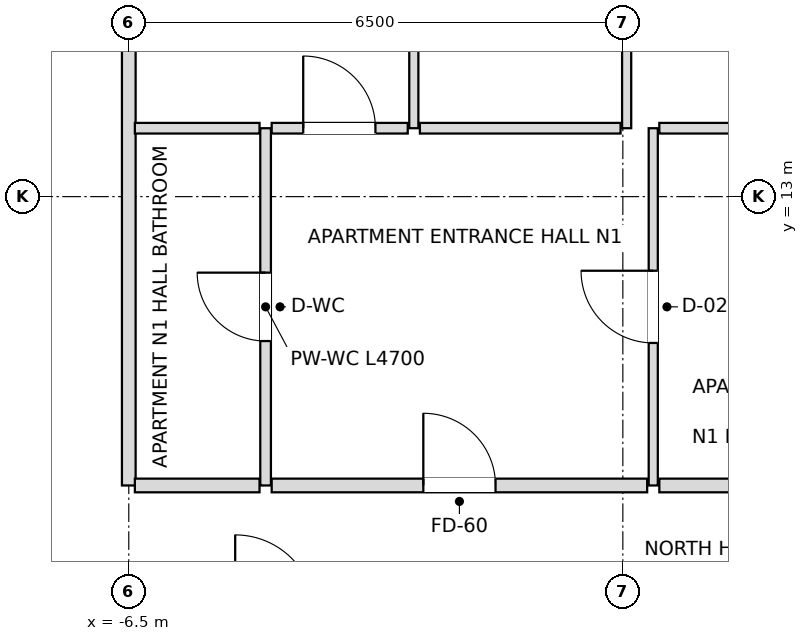
"""IFC4 building model, lengths in metres.
Left out: names, types, materials, properties, quantities, classifications, styles, units other than length and angle.
Written with IfcOpenShell. Run it as: python <this file> out.ifc"""

import sys

from ifc_helpers import new_model, si_unit, direction, frame, frame_2d, origin, place, context, subcontext, project, spatial, rectangle, extrude, element, fill, save


model = new_model("IFC4")
c1 = context("Model", 3, precision=1e-05, world=origin(), true_north=direction((0.0, 1.0)))
c2 = subcontext(c1, "Body", "Model", "MODEL_VIEW")
j1 = project(units=[si_unit("LENGTHUNIT", "METRE"), si_unit("PLANEANGLEUNIT", "RADIAN")], contexts=[c1])
p1 = place(None, origin())
s1 = spatial("IfcSite", under=j1, at=p1, CompositionType="ELEMENT")
p2 = place(p1, origin())
s2 = spatial("IfcBuilding", under=s1, at=p2, CompositionType="ELEMENT")
p3 = place(p2, frame((0.0, 0.0, 233.1)))
s3 = spatial("IfcBuildingStorey", under=s2, at=p3, CompositionType="ELEMENT", Elevation=233.1)
p4 = place(p3, frame((-6.5, 9.2, 0.0), z_axis=(0.0, 0.0, 1.0), x_axis=(0.0, 1.0, 0.0)))
e1 = element("IfcWall", 1, at=p4, inside=s3, PredefinedType="PARTITIONING", context=c2, shape_type="SweptSolid", body=[
    extrude(rectangle(XDim=10.7, YDim=0.18, at=frame_2d((5.35, 0.0))), origin(), (0.0, 0.0, 1.0), 2.826),
])
p5 = place(p3, frame((-4.7, 9.2, 0.0), z_axis=(0.0, 0.0, 1.0), x_axis=(0.0, 1.0, 0.0)))
e2 = element("IfcWall", 2, at=p5, inside=s3, PredefinedType="PARTITIONING", context=c2, shape_type="SweptSolid", body=[
    extrude(rectangle(XDim=4.7, YDim=0.14, at=frame_2d((2.35, 0.0))), origin(), (0.0, 0.0, 1.0), 3.38),
])
p6 = place(p5, frame((1.9, 0.0, 0.0)))
e3 = element("IfcOpeningElement", 3, at=p6, cuts=e2, PredefinedType="OPENING", context=c2, shape_type="SweptSolid", body=[
    extrude(rectangle(XDim=0.9, YDim=2.1, at=frame_2d((0.45, 1.05))), frame((0.0, 0.08, 0.0), z_axis=(0.0, -1.0, 0.0), x_axis=(1.0, 0.0, 0.0)), (0.0, 0.0, 1.0), 0.16),
])
p7 = place(p3, frame((-2.75, 13.9, 0.0), z_axis=(0.0, 0.0, 1.0), x_axis=(0.0, 1.0, 0.0)))
e4 = element("IfcWall", 4, at=p7, inside=s3, PredefinedType="PARTITIONING", context=c2, shape_type="SweptSolid", body=[
    extrude(rectangle(XDim=6.0, YDim=0.12, at=frame_2d((3.0, 0.0))), origin(), (0.0, 0.0, 1.0), 3.018),
])
p8 = place(p7, frame((2.55, 0.0, 0.0)))
e5 = element("IfcOpeningElement", 5, at=p8, cuts=e4, PredefinedType="OPENING", context=c2, shape_type="SweptSolid", body=[
    extrude(rectangle(XDim=0.9, YDim=2.1, at=frame_2d((0.45, 1.05))), frame((0.0, 0.07, 0.0), z_axis=(0.0, -1.0, 0.0), x_axis=(1.0, 0.0, 0.0)), (0.0, 0.0, 1.0), 0.14),
])
p9 = place(p3, frame((0.05, 13.9, 0.0), z_axis=(0.0, 0.0, 1.0), x_axis=(0.0, 1.0, 0.0)))
e6 = element("IfcWall", 6, at=p9, inside=s3, PredefinedType="PARTITIONING", context=c2, shape_type="SweptSolid", body=[
    extrude(rectangle(XDim=6.0, YDim=0.12, at=frame_2d((3.0, 0.0))), origin(), (0.0, 0.0, 1.0), 3.018),
])
p10 = place(p9, frame((2.55, 0.0, 0.0)))
e7 = element("IfcOpeningElement", 7, at=p10, cuts=e6, PredefinedType="OPENING", context=c2, shape_type="SweptSolid", body=[
    extrude(rectangle(XDim=0.9, YDim=2.1, at=frame_2d((0.45, 1.05))), frame((0.0, 0.07, 0.0), z_axis=(0.0, -1.0, 0.0), x_axis=(1.0, 0.0, 0.0)), (0.0, 0.0, 1.0), 0.14),
])
p11 = place(p3, frame((0.4, 9.2, 0.0), z_axis=(0.0, 0.0, 1.0), x_axis=(0.0, 1.0, 0.0)))
e8 = element("IfcWall", 8, at=p11, inside=s3, PredefinedType="PARTITIONING", context=c2, shape_type="SweptSolid", body=[
    extrude(rectangle(XDim=4.7, YDim=0.12, at=frame_2d((2.35, 0.0))), origin(), (0.0, 0.0, 1.0), 3.38),
])
p12 = place(p11, frame((1.875, 0.0, 0.0)))
e9 = element("IfcOpeningElement", 9, at=p12, cuts=e8, PredefinedType="OPENING", context=c2, shape_type="SweptSolid", body=[
    extrude(rectangle(XDim=0.95, YDim=2.1, at=frame_2d((0.475, 1.05))), frame((0.0, 0.07, 0.0), z_axis=(0.0, -1.0, 0.0), x_axis=(1.0, 0.0, 0.0)), (0.0, 0.0, 1.0), 0.14),
])
p13 = place(p3, frame((-6.42, 9.2, 0.0), z_axis=(0.0, 0.0, 1.0), x_axis=(1.0, 0.0, 0.0)))
e10 = element("IfcWall", 10, at=p13, inside=s3, PredefinedType="PARTITIONING", context=c2, shape_type="SweptSolid", body=[
    extrude(rectangle(XDim=1.64, YDim=0.18, at=frame_2d((0.82, 0.0))), origin(), (0.0, 0.0, 1.0), 3.38),
])
p14 = place(p3, frame((-4.62, 9.2, 0.0), z_axis=(0.0, 0.0, 1.0), x_axis=(1.0, 0.0, 0.0)))
e11 = element("IfcWall", 11, at=p14, inside=s3, PredefinedType="PARTITIONING", context=c2, shape_type="SweptSolid", body=[
    extrude(rectangle(XDim=4.94, YDim=0.18, at=frame_2d((2.47, 0.0))), origin(), (0.0, 0.0, 1.0), 3.38),
])
p15 = place(p14, frame((1.995, 0.0, 0.0)))
e12 = element("IfcOpeningElement", 12, at=p15, cuts=e11, PredefinedType="OPENING", context=c2, shape_type="SweptSolid", body=[
    extrude(rectangle(XDim=0.95, YDim=2.15, at=frame_2d((0.475, 1.075))), frame((0.0, 0.1, 0.0), z_axis=(0.0, -1.0, 0.0), x_axis=(1.0, 0.0, 0.0)), (0.0, 0.0, 1.0), 0.2),
])
p16 = place(p3, frame((0.48, 9.2, 0.0), z_axis=(0.0, 0.0, 1.0), x_axis=(1.0, 0.0, 0.0)))
e13 = element("IfcWall", 13, at=p16, inside=s3, PredefinedType="PARTITIONING", context=c2, shape_type="SweptSolid", body=[
    extrude(rectangle(XDim=2.24, YDim=0.18, at=frame_2d((1.12, 0.0))), origin(), (0.0, 0.0, 1.0), 3.38),
])
p17 = place(p3, frame((-6.42, 13.9, 0.0), z_axis=(0.0, 0.0, 1.0), x_axis=(1.0, 0.0, 0.0)))
e14 = element("IfcWall", 14, at=p17, inside=s3, PredefinedType="PARTITIONING", context=c2, shape_type="SweptSolid", body=[
    extrude(rectangle(XDim=1.64, YDim=0.14, at=frame_2d((0.82, 0.0))), origin(), (0.0, 0.0, 1.0), 3.38),
])
p18 = place(p3, frame((-4.62, 13.9, 0.0), z_axis=(0.0, 0.0, 1.0), x_axis=(1.0, 0.0, 0.0)))
e15 = element("IfcWall", 15, at=p18, inside=s3, PredefinedType="PARTITIONING", context=c2, shape_type="SweptSolid", body=[
    extrude(rectangle(XDim=1.79, YDim=0.14, at=frame_2d((0.895, 0.0))), origin(), (0.0, 0.0, 1.0), 3.38),
])
p19 = place(p18, frame((0.415, 0.0, 0.0)))
e16 = element("IfcOpeningElement", 16, at=p19, cuts=e15, PredefinedType="OPENING", context=c2, shape_type="SweptSolid", body=[
    extrude(rectangle(XDim=0.95, YDim=2.1, at=frame_2d((0.475, 1.05))), frame((0.0, 0.08, 0.0), z_axis=(0.0, -1.0, 0.0), x_axis=(1.0, 0.0, 0.0)), (0.0, 0.0, 1.0), 0.16),
])
p20 = place(p3, frame((-2.67, 13.9, 0.0), z_axis=(0.0, 0.0, 1.0), x_axis=(1.0, 0.0, 0.0)))
e17 = element("IfcWall", 17, at=p20, inside=s3, PredefinedType="PARTITIONING", context=c2, shape_type="SweptSolid", body=[
    extrude(rectangle(XDim=2.64, YDim=0.14, at=frame_2d((1.32, 0.0))), origin(), (0.0, 0.0, 1.0), 3.38),
])
p21 = place(p3, frame((0.48, 13.9, 0.0), z_axis=(0.0, 0.0, 1.0), x_axis=(1.0, 0.0, 0.0)))
e18 = element("IfcWall", 18, at=p21, inside=s3, PredefinedType="PARTITIONING", context=c2, shape_type="SweptSolid", body=[
    extrude(rectangle(XDim=2.24, YDim=0.14, at=frame_2d((1.12, 0.0))), origin(), (0.0, 0.0, 1.0), 3.38),
])
p22 = place(p6, origin())
e19 = element("IfcDoor", 19, at=p22, inside=s3, OperationType="SINGLE_SWING_RIGHT", PredefinedType="DOOR", context=c2, shape_type="SweptSolid", body=[
    extrude(rectangle(XDim=0.9, YDim=2.1, at=frame_2d((0.45, 1.05))), frame((0.0, 0.025, 0.0), z_axis=(0.0, -1.0, 0.0), x_axis=(1.0, 0.0, 0.0)), (0.0, 0.0, 1.0), 0.05),
])
fill(e3, e19)
p23 = place(p15, origin())
e20 = element("IfcDoor", 20, at=p23, inside=s3, OperationType="SINGLE_SWING_LEFT", PredefinedType="DOOR", context=c2, shape_type="SweptSolid", body=[
    extrude(rectangle(XDim=0.95, YDim=2.15, at=frame_2d((0.475, 1.075))), frame((0.0, 0.025, 0.0), z_axis=(0.0, -1.0, 0.0), x_axis=(1.0, 0.0, 0.0)), (0.0, 0.0, 1.0), 0.05),
])
fill(e12, e20)
p24 = place(p12, origin())
e21 = element("IfcDoor", 21, at=p24, inside=s3, OperationType="SINGLE_SWING_RIGHT", PredefinedType="DOOR", context=c2, shape_type="SweptSolid", body=[
    extrude(rectangle(XDim=0.95, YDim=2.1, at=frame_2d((0.475, 1.05))), frame((0.0, 0.025, 0.0), z_axis=(0.0, -1.0, 0.0), x_axis=(1.0, 0.0, 0.0)), (0.0, 0.0, 1.0), 0.05),
])
fill(e9, e21)
p25 = place(p19, origin())
e22 = element("IfcDoor", 22, at=p25, inside=s3, OperationType="SINGLE_SWING_LEFT", PredefinedType="DOOR", context=c2, shape_type="SweptSolid", body=[
    extrude(rectangle(XDim=0.95, YDim=2.1, at=frame_2d((0.475, 1.05))), frame((0.0, 0.025, 0.0), z_axis=(0.0, -1.0, 0.0), x_axis=(1.0, 0.0, 0.0)), (0.0, 0.0, 1.0), 0.05),
])
fill(e16, e22)
save(model, sys.argv[1])
